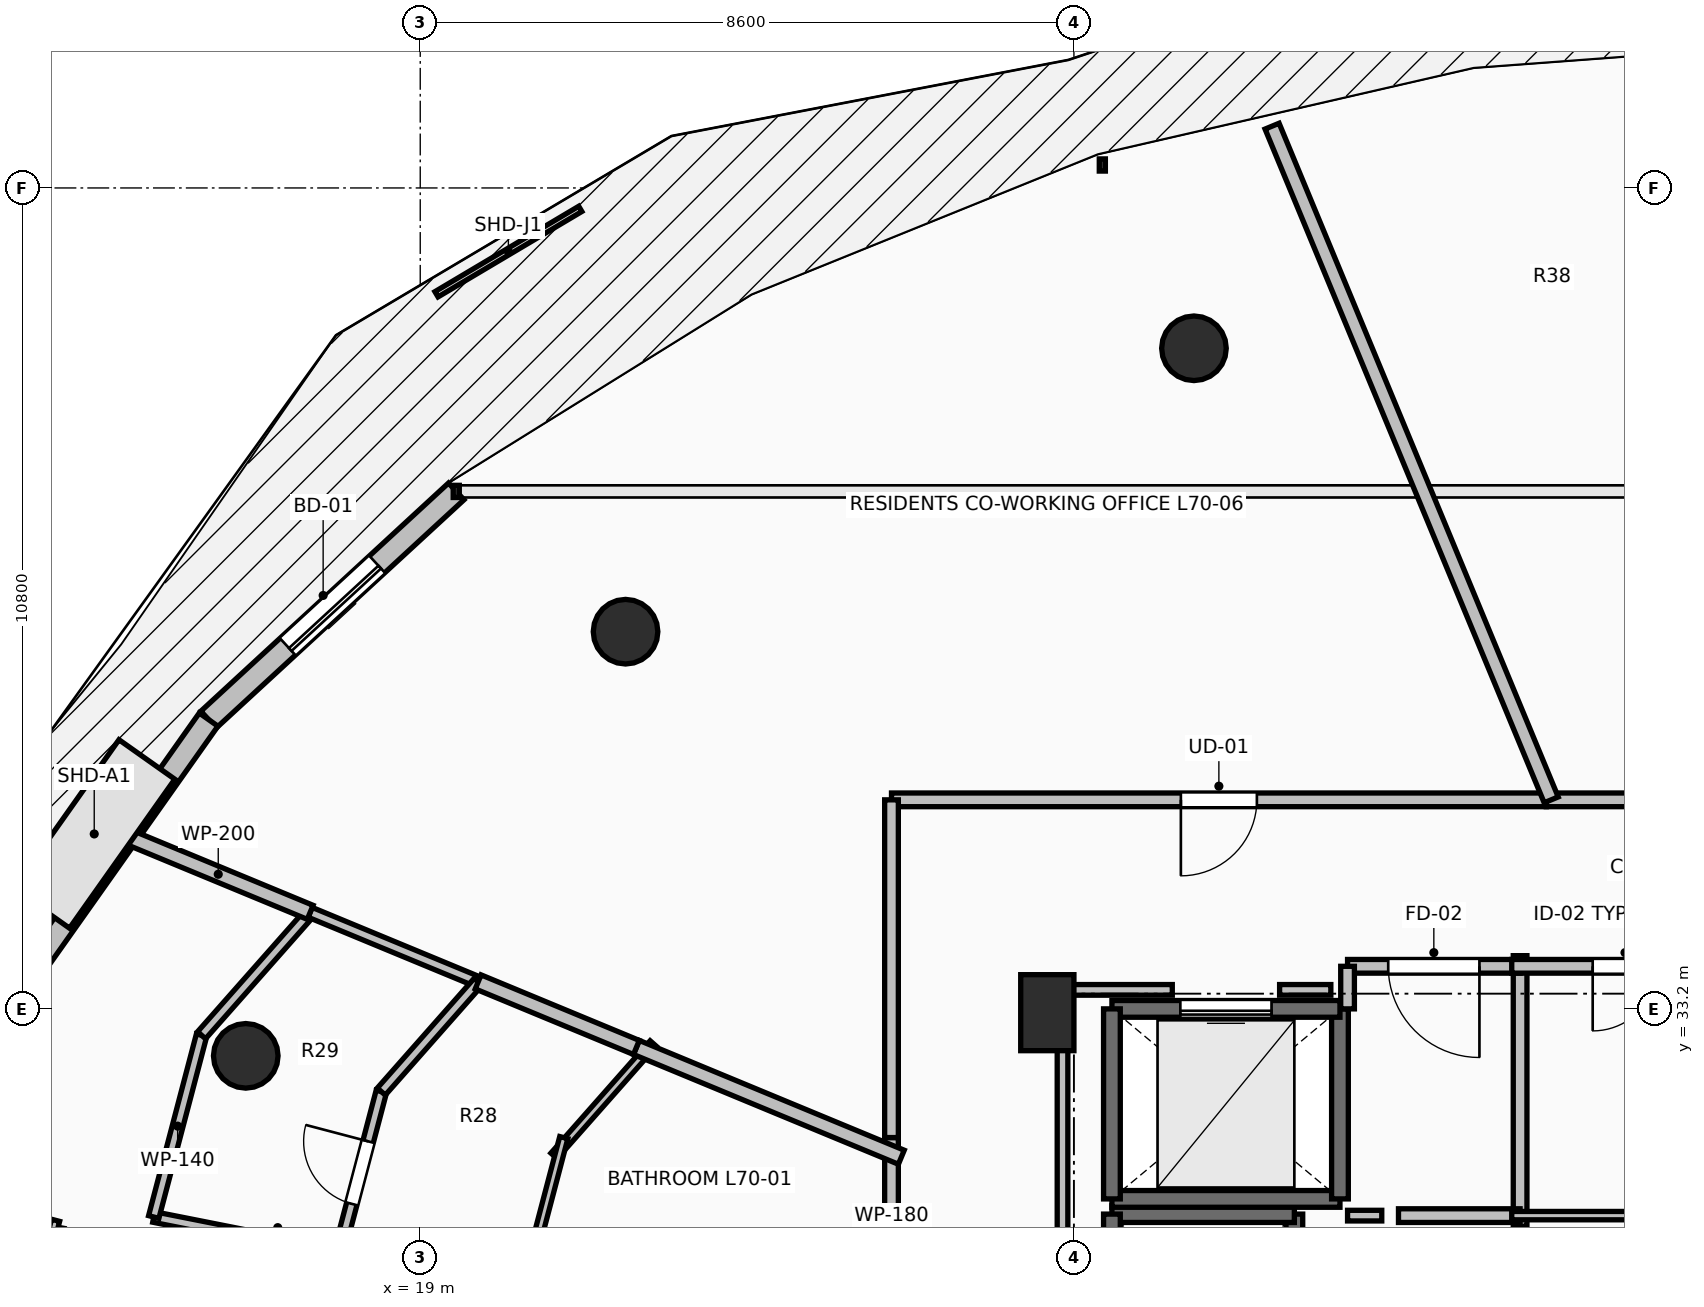
"""IFC4 building model, lengths in metres.
Left out: names, types, materials, properties, quantities, classifications, styles, units other than length and angle.
Written with IfcOpenShell. Run it as: python <this file> out.ifc"""

import sys

from ifc_helpers import new_model, si_unit, direction, frame, frame_2d, origin, origin_2d, place, context, subcontext, project, spatial, rectangle, circle, extrude, element, fill, save


model = new_model("IFC4")
c1 = context("Model", 3, precision=1e-05, world=origin(), true_north=direction((0.0, 1.0)))
c2 = subcontext(c1, "Body", "Model", "MODEL_VIEW")
j1 = project(units=[si_unit("LENGTHUNIT", "METRE"), si_unit("PLANEANGLEUNIT", "RADIAN")], contexts=[c1])
p1 = place(None, origin())
s1 = spatial("IfcSite", under=j1, at=p1, CompositionType="ELEMENT")
p2 = place(p1, origin())
s2 = spatial("IfcBuilding", under=s1, at=p2, CompositionType="ELEMENT")
p3 = place(p2, frame((0.0, 0.0, 259.1)))
s3 = spatial("IfcBuildingStorey", under=s2, at=p3, CompositionType="ELEMENT", Elevation=259.1)
for number, where, z_axis, x_axis in (
    (1, (29.179, 41.891, 0.0), (0.0, 0.0, 1.0), (-0.383, 0.924, 0.0)),
    (2, (21.701, 38.162, 0.0), (0.0, 0.0, 1.0), (-0.707, 0.707, 0.0)),
    (3, (16.705, 32.582, 0.0), (0.0, 0.0, 1.0), (-0.924, 0.383, 0.0)),
):
    element("IfcColumn", number, at=place(p3, frame(where, z_axis=z_axis, x_axis=x_axis)), inside=s3, PredefinedType="COLUMN", context=c2, shape_type="SweptSolid", body=[
        extrude(circle(Radius=0.425, at=origin_2d()), origin(), (0.0, 0.0, 1.0), 3.55),
    ])
p4 = place(p3, frame((27.25, 33.15, 0.0), z_axis=(0.0, 0.0, 1.0), x_axis=(1.0, 0.0, 0.0)))
e4 = element("IfcColumn", 4, at=p4, inside=s3, PredefinedType="PILASTER", context=c2, shape_type="SweptSolid", body=[
    extrude(rectangle(XDim=0.7, YDim=1.0, at=origin_2d()), origin(), (0.0, 0.0, 1.0), 3.55),
])
p5 = place(p3, frame((19.474, 40.008, 0.0), z_axis=(0.0, 0.0, 1.0), x_axis=(-0.735445373611, -0.677584018727, 0.0)))
e5 = element("IfcWall", 5, at=p5, inside=s3, PredefinedType="STANDARD", context=c2, shape_type="SweptSolid", body=[
    extrude(rectangle(XDim=4.43, YDim=0.3, at=frame_2d((2.215, 0.0))), origin(), (0.0, 0.0, 1.0), 3.29),
])
p6 = place(p5, frame((1.415, 0.0, 0.0)))
e6 = element("IfcOpeningElement", 6, at=p6, cuts=e5, PredefinedType="OPENING", context=c2, shape_type="SweptSolid", body=[
    extrude(rectangle(XDim=1.6, YDim=2.3, at=frame_2d((0.8, 1.15))), frame((0.0, 0.165, 0.0), z_axis=(0.0, -1.0, 0.0), x_axis=(1.0, 0.0, 0.0)), (0.0, 0.0, 1.0), 0.33),
])
p7 = place(p3, frame((16.216, 37.006, 0.0), z_axis=(0.0, 0.0, 1.0), x_axis=(-0.577261247247, -0.816559521668, 0.0)))
e7 = element("IfcWall", 7, at=p7, inside=s3, PredefinedType="STANDARD", context=c2, shape_type="SweptSolid", body=[
    extrude(rectangle(XDim=4.194, YDim=0.3, at=frame_2d((2.097, 0.0))), origin(), (0.0, 0.0, 1.0), 3.29),
])
p8 = place(p3, frame((30.5, 28.0, 0.0), z_axis=(0.0, 0.0, 1.0), x_axis=(0.0, 1.0, 0.0)))
e8 = element("IfcWall", 8, at=p8, inside=s3, PredefinedType="SHEAR", context=c2, shape_type="SweptSolid", body=[
    extrude(rectangle(XDim=2.5, YDim=0.22, at=frame_2d((1.25, 0.0))), origin(), (0.0, 0.0, 1.0), 3.29),
])
p9 = place(p3, frame((30.5, 30.5, 0.0), z_axis=(0.0, 0.0, 1.0), x_axis=(-1.0, 0.0, 0.0)))
e9 = element("IfcWall", 9, at=p9, inside=s3, PredefinedType="SHEAR", context=c2, shape_type="SweptSolid", body=[
    extrude(rectangle(XDim=2.4, YDim=0.22, at=frame_2d((1.2, 0.0))), origin(), (0.0, 0.0, 1.0), 3.29),
])
p10 = place(p3, frame((28.1, 30.5, 0.0), z_axis=(0.0, 0.0, 1.0), x_axis=(0.0, -1.0, 0.0)))
e10 = element("IfcWall", 10, at=p10, inside=s3, PredefinedType="SHEAR", context=c2, shape_type="SweptSolid", body=[
    extrude(rectangle(XDim=2.5, YDim=0.22, at=frame_2d((1.25, 0.0))), origin(), (0.0, 0.0, 1.0), 3.29),
])
p11 = place(p3, frame((28.1, 30.7, 0.0), z_axis=(0.0, 0.0, 1.0), x_axis=(1.0, 0.0, 0.0)))
e11 = element("IfcWall", 11, at=p11, inside=s3, PredefinedType="SOLIDWALL", context=c2, shape_type="SweptSolid", body=[
    extrude(rectangle(XDim=3.0, YDim=0.22, at=frame_2d((1.5, 0.0))), origin(), (0.0, 0.0, 1.0), 3.29),
])
p12 = place(p3, frame((31.1, 30.7, 0.0), z_axis=(0.0, 0.0, 1.0), x_axis=(0.0, 1.0, 0.0)))
e12 = element("IfcWall", 12, at=p12, inside=s3, PredefinedType="SOLIDWALL", context=c2, shape_type="SweptSolid", body=[
    extrude(rectangle(XDim=2.5, YDim=0.22, at=frame_2d((1.25, 0.0))), origin(), (0.0, 0.0, 1.0), 3.29),
])
p13 = place(p3, frame((31.1, 33.2, 0.0), z_axis=(0.0, 0.0, 1.0), x_axis=(-1.0, 0.0, 0.0)))
e13 = element("IfcWall", 13, at=p13, inside=s3, PredefinedType="SOLIDWALL", context=c2, shape_type="SweptSolid", body=[
    extrude(rectangle(XDim=3.0, YDim=0.22, at=frame_2d((1.5, 0.0))), origin(), (0.0, 0.0, 1.0), 3.29),
])
p14 = place(p13, frame((0.9, 0.0, 0.0)))
e14 = element("IfcOpeningElement", 14, at=p14, cuts=e13, PredefinedType="OPENING", context=c2, shape_type="SweptSolid", body=[
    extrude(rectangle(XDim=1.2, YDim=2.2, at=frame_2d((0.6, 1.1))), frame((0.0, 0.125, 0.0), z_axis=(0.0, -1.0, 0.0), x_axis=(1.0, 0.0, 0.0)), (0.0, 0.0, 1.0), 0.25),
])
p15 = place(p3, frame((28.1, 33.2, 0.0), z_axis=(0.0, 0.0, 1.0), x_axis=(0.0, -1.0, 0.0)))
e15 = element("IfcWall", 15, at=p15, inside=s3, PredefinedType="SOLIDWALL", context=c2, shape_type="SweptSolid", body=[
    extrude(rectangle(XDim=2.5, YDim=0.22, at=frame_2d((1.25, 0.0))), origin(), (0.0, 0.0, 1.0), 3.29),
])
p16 = place(p3, frame((33.47, 30.34, 0.0), z_axis=(0.0, 0.0, 1.0), x_axis=(0.0, 1.0, 0.0)))
e16 = element("IfcWall", 16, at=p16, inside=s3, PredefinedType="PARTITIONING", context=c2, shape_type="SweptSolid", body=[
    extrude(rectangle(XDim=3.56, YDim=0.18, at=frame_2d((1.78, 0.0))), origin(), (0.0, 0.0, 1.0), 3.29),
])
p17 = place(p3, frame((31.87, 30.48, 0.0), z_axis=(0.0, 0.0, 1.0), x_axis=(1.0, 0.0, 0.0)))
e17 = element("IfcWall", 17, at=p17, inside=s3, PredefinedType="PARTITIONING", context=c2, shape_type="SweptSolid", body=[
    extrude(rectangle(XDim=1.6, YDim=0.18, at=frame_2d((0.8, 0.0))), origin(), (0.0, 0.0, 1.0), 3.29),
])
p18 = place(p3, frame((33.47, 33.76, 0.0), z_axis=(0.0, 0.0, 1.0), x_axis=(-1.0, 0.0, 0.0)))
e18 = element("IfcWall", 18, at=p18, inside=s3, PredefinedType="PARTITIONING", context=c2, shape_type="SweptSolid", body=[
    extrude(rectangle(XDim=2.27, YDim=0.18, at=frame_2d((1.135, 0.0))), origin(), (0.0, 0.0, 1.0), 3.29),
])
p19 = place(p18, frame((0.535, 0.0, 0.0)))
e19 = element("IfcOpeningElement", 19, at=p19, cuts=e18, PredefinedType="OPENING", context=c2, shape_type="SweptSolid", body=[
    extrude(rectangle(XDim=1.2, YDim=2.15, at=frame_2d((0.6, 1.075))), frame((0.0, 0.105, 0.0), z_axis=(0.0, -1.0, 0.0), x_axis=(1.0, 0.0, 0.0)), (0.0, 0.0, 1.0), 0.21),
])
p20 = place(p3, frame((31.2, 33.76, 0.0), z_axis=(0.0, 0.0, 1.0), x_axis=(0.0, -1.0, 0.0)))
e20 = element("IfcWall", 20, at=p20, inside=s3, PredefinedType="PARTITIONING", context=c2, shape_type="SweptSolid", body=[
    extrude(rectangle(XDim=0.56, YDim=0.18, at=frame_2d((0.28, 0.0))), origin(), (0.0, 0.0, 1.0), 3.29),
])
p21 = place(p3, frame((33.36, 30.48, 0.0), z_axis=(0.0, 0.0, 1.0), x_axis=(1.0, 0.0, 0.0)))
e21 = element("IfcWall", 21, at=p21, inside=s3, PredefinedType="PARTITIONING", context=c2, shape_type="SweptSolid", body=[
    extrude(rectangle(XDim=1.81, YDim=0.11, at=frame_2d((0.905, 0.0))), origin(), (0.0, 0.0, 1.0), 3.29),
])
p22 = place(p3, frame((36.34, 33.76, 0.0), z_axis=(0.0, 0.0, 1.0), x_axis=(-1.0, 0.0, 0.0)))
e22 = element("IfcWall", 22, at=p22, inside=s3, PredefinedType="PARTITIONING", context=c2, shape_type="SweptSolid", body=[
    extrude(rectangle(XDim=2.98, YDim=0.18, at=frame_2d((1.49, 0.0))), origin(), (0.0, 0.0, 1.0), 3.29),
])
p23 = place(p22, frame((1.065, 0.0, 0.0)))
e23 = element("IfcOpeningElement", 23, at=p23, cuts=e22, PredefinedType="OPENING", context=c2, shape_type="SweptSolid", body=[
    extrude(rectangle(XDim=0.85, YDim=2.1, at=frame_2d((0.425, 1.05))), frame((0.0, 0.105, 0.0), z_axis=(0.0, -1.0, 0.0), x_axis=(1.0, 0.0, 0.0)), (0.0, 0.0, 1.0), 0.21),
])
p24 = place(p3, frame((25.2, 31.507, 0.0), z_axis=(0.0, 0.0, 1.0), x_axis=(0.0, -1.0, 0.0)))
e24 = element("IfcWall", 24, at=p24, inside=s3, PredefinedType="PARTITIONING", context=c2, shape_type="SweptSolid", body=[
    extrude(rectangle(XDim=3.048, YDim=0.18, at=frame_2d((1.524, 0.0))), origin(), (0.0, 0.0, 1.0), 2.482),
])
p25 = place(p3, frame((36.55, 35.95, 0.0), z_axis=(0.0, 0.0, 1.0), x_axis=(-1.0, 0.0, 0.0)))
e25 = element("IfcWall", 25, at=p25, inside=s3, PredefinedType="PARTITIONING", context=c2, shape_type="SweptSolid", body=[
    extrude(rectangle(XDim=2.736, YDim=0.18, at=frame_2d((1.368, 0.0))), origin(), (0.0, 0.0, 1.0), 3.29),
])
p26 = place(p3, frame((33.814, 35.95, 0.0), z_axis=(0.0, 0.0, 1.0), x_axis=(-1.0, 0.0, 0.0)))
e26 = element("IfcWall", 26, at=p26, inside=s3, PredefinedType="PARTITIONING", context=c2, shape_type="SweptSolid", body=[
    extrude(rectangle(XDim=8.614, YDim=0.18, at=frame_2d((4.307, 0.0))), origin(), (0.0, 0.0, 1.0), 2.482),
])
p27 = place(p26, frame((3.807, 0.0, 0.0)))
e27 = element("IfcOpeningElement", 27, at=p27, cuts=e26, PredefinedType="OPENING", context=c2, shape_type="SweptSolid", body=[
    extrude(rectangle(XDim=1.0, YDim=2.15, at=frame_2d((0.5, 1.075))), frame((0.0, 0.105, 0.0), z_axis=(0.0, -1.0, 0.0), x_axis=(1.0, 0.0, 0.0)), (0.0, 0.0, 1.0), 0.21),
])
p28 = place(p3, frame((25.2, 35.95, 0.0), z_axis=(0.0, 0.0, 1.0), x_axis=(0.0, -1.0, 0.0)))
e28 = element("IfcWall", 28, at=p28, inside=s3, PredefinedType="PARTITIONING", context=c2, shape_type="SweptSolid", body=[
    extrude(rectangle(XDim=4.443, YDim=0.18, at=frame_2d((2.221, 0.0))), origin(), (0.0, 0.0, 1.0), 2.482),
])
p29 = place(p3, frame((19.236, 29.72, 0.0), z_axis=(0.0, 0.0, 1.0), x_axis=(-0.980906665774, 0.194479081243, 0.0)))
e29 = element("IfcWall", 29, at=p29, inside=s3, PredefinedType="PARTITIONING", context=c2, shape_type="SweptSolid", body=[
    extrude(rectangle(XDim=3.815, YDim=0.14, at=frame_2d((1.907, 0.0))), origin(), (0.0, 0.0, 1.0), 2.874),
])
p30 = place(p29, frame((1.737, 0.0, 0.0)))
e30 = element("IfcOpeningElement", 30, at=p30, cuts=e29, PredefinedType="OPENING", context=c2, shape_type="SweptSolid", body=[
    extrude(rectangle(XDim=0.9, YDim=2.1, at=frame_2d((0.45, 1.05))), frame((0.0, 0.085, 0.0), z_axis=(0.0, -1.0, 0.0), x_axis=(1.0, 0.0, 0.0)), (0.0, 0.0, 1.0), 0.17),
])
p31 = place(p3, frame((15.494, 30.462, 0.0), z_axis=(0.0, 0.0, 1.0), x_axis=(0.254459276467, 0.967083489995, 0.0)))
e31 = element("IfcWall", 31, at=p31, inside=s3, PredefinedType="PARTITIONING", context=c2, shape_type="SweptSolid", body=[
    extrude(rectangle(XDim=2.472, YDim=0.14, at=frame_2d((1.236, 0.0))), origin(), (0.0, 0.0, 1.0), 3.29),
])
p32 = place(p3, frame((16.123, 32.853, 0.0), z_axis=(0.0, 0.0, 1.0), x_axis=(0.662205183315, 0.749322557508, 0.0)))
e32 = element("IfcWall", 32, at=p32, inside=s3, PredefinedType="PARTITIONING", context=c2, shape_type="SweptSolid", body=[
    extrude(rectangle(XDim=2.158, YDim=0.14, at=frame_2d((1.079, 0.0))), origin(), (0.0, 0.0, 1.0), 3.29),
])
p33 = place(p3, frame((17.552, 34.47, 0.0), z_axis=(0.0, 0.0, 1.0), x_axis=(0.923932252837, -0.382556129434, 0.0)))
e33 = element("IfcWall", 33, at=p33, inside=s3, PredefinedType="PARTITIONING", context=c2, shape_type="SweptSolid", body=[
    extrude(rectangle(XDim=2.392, YDim=0.14, at=frame_2d((1.196, 0.0))), origin(), (0.0, 0.0, 1.0), 2.874),
])
p34 = place(p3, frame((12.45, 30.592, 0.0), z_axis=(0.0, 0.0, 1.0), x_axis=(0.984212226867, -0.176992351488, 0.0)))
e34 = element("IfcWall", 34, at=p34, inside=s3, PredefinedType="PARTITIONING", context=c2, shape_type="SweptSolid", body=[
    extrude(rectangle(XDim=1.884, YDim=0.11, at=frame_2d((0.942, 0.0))), origin(), (0.0, 0.0, 1.0), 3.29),
])
p35 = place(p3, frame((14.203, 30.418, 0.0), z_axis=(0.0, 0.0, 1.0), x_axis=(-0.254460123068, -0.967083267236, 0.0)))
e35 = element("IfcWall", 35, at=p35, inside=s3, PredefinedType="PARTITIONING", context=c2, shape_type="SweptSolid", body=[
    extrude(rectangle(XDim=4.709, YDim=0.11, at=frame_2d((2.354, 0.0))), origin(), (0.0, 0.0, 1.0), 3.29),
])
p36 = place(p35, frame((1.904, 0.0, 0.0)))
e36 = element("IfcOpeningElement", 36, at=p36, cuts=e35, PredefinedType="OPENING", context=c2, shape_type="SweptSolid", body=[
    extrude(rectangle(XDim=0.9, YDim=2.1, at=frame_2d((0.45, 1.05))), frame((0.0, 0.07, 0.0), z_axis=(0.0, -1.0, 0.0), x_axis=(1.0, 0.0, 0.0)), (0.0, 0.0, 1.0), 0.14),
])
p37 = place(p3, frame((17.552, 34.47, 0.0), z_axis=(0.0, 0.0, 1.0), x_axis=(-0.9239134198, 0.382601610965, 0.0)))
e37 = element("IfcWall", 37, at=p37, inside=s3, PredefinedType="PARTITIONING", context=c2, shape_type="SweptSolid", body=[
    extrude(rectangle(XDim=2.618, YDim=0.2, at=frame_2d((1.309, 0.0))), origin(), (0.0, 0.0, 1.0), 3.29),
])
p38 = place(p3, frame((17.927, 29.98, 0.0), z_axis=(0.0, 0.0, 1.0), x_axis=(0.254476946675, 0.967078840432, 0.0)))
e38 = element("IfcWall", 38, at=p38, inside=s3, PredefinedType="PARTITIONING", context=c2, shape_type="SweptSolid", body=[
    extrude(rectangle(XDim=2.205, YDim=0.14, at=frame_2d((1.102, 0.0))), origin(), (0.0, 0.0, 1.0), 2.482),
])
p39 = place(p38, frame((0.677, 0.0, 0.0)))
e39 = element("IfcOpeningElement", 39, at=p39, cuts=e38, PredefinedType="OPENING", context=c2, shape_type="SweptSolid", body=[
    extrude(rectangle(XDim=0.85, YDim=2.1, at=frame_2d((0.425, 1.05))), frame((0.0, 0.085, 0.0), z_axis=(0.0, -1.0, 0.0), x_axis=(1.0, 0.0, 0.0)), (0.0, 0.0, 1.0), 0.17),
])
p40 = place(p3, frame((18.488, 32.112, 0.0), z_axis=(0.0, 0.0, 1.0), x_axis=(0.661856531983, 0.749630529709, 0.0)))
e40 = element("IfcWall", 40, at=p40, inside=s3, PredefinedType="PARTITIONING", context=c2, shape_type="SweptSolid", body=[
    extrude(rectangle(XDim=1.925, YDim=0.14, at=frame_2d((0.962, 0.0))), origin(), (0.0, 0.0, 1.0), 2.482),
])
p41 = place(p3, frame((22.066, 32.744, 0.0), z_axis=(0.0, 0.0, 1.0), x_axis=(-0.662047420969, -0.749461948593, 0.0)))
e41 = element("IfcWall", 41, at=p41, inside=s3, PredefinedType="PARTITIONING", context=c2, shape_type="SweptSolid", body=[
    extrude(rectangle(XDim=1.972, YDim=0.11, at=frame_2d((0.986, 0.0))), origin(), (0.0, 0.0, 1.0), 3.29),
])
p42 = place(p3, frame((20.889, 31.506, 0.0), z_axis=(0.0, 0.0, 1.0), x_axis=(-0.254406599134, -0.967097348935, 0.0)))
e42 = element("IfcWall", 42, at=p42, inside=s3, PredefinedType="PARTITIONING", context=c2, shape_type="SweptSolid", body=[
    extrude(rectangle(XDim=2.218, YDim=0.11, at=frame_2d((1.109, 0.0))), origin(), (0.0, 0.0, 1.0), 2.482),
])
p43 = place(p3, frame((25.329, 31.248, 0.0), z_axis=(0.0, 0.0, 1.0), x_axis=(-0.923827524065, 0.382808967736, 0.0)))
e43 = element("IfcWall", 43, at=p43, inside=s3, PredefinedType="PARTITIONING", context=c2, shape_type="SweptSolid", body=[
    extrude(rectangle(XDim=3.773, YDim=0.2, at=frame_2d((1.886, 0.0))), origin(), (0.0, 0.0, 1.0), 2.936),
])
p44 = place(p3, frame((21.844, 32.693, 0.0), z_axis=(0.0, 0.0, 1.0), x_axis=(-0.92387949598, 0.382683520559, 0.0)))
e44 = element("IfcWall", 44, at=p44, inside=s3, PredefinedType="PARTITIONING", context=c2, shape_type="SweptSolid", body=[
    extrude(rectangle(XDim=2.253, YDim=0.2, at=frame_2d((1.127, 0.0))), origin(), (0.0, 0.0, 1.0), 3.022),
])
p45 = place(p3, frame((30.207, 44.813, 0.0), z_axis=(0.0, 0.0, 1.0), x_axis=(0.38274436158, -0.92385429245, 0.0)))
e45 = element("IfcWall", 45, at=p45, inside=s3, PredefinedType="PARTITIONING", context=c2, shape_type="SweptSolid", body=[
    extrude(rectangle(XDim=9.594, YDim=0.2, at=frame_2d((4.797, 0.0))), origin(), (0.0, 0.0, 1.0), 2.482),
])
p46 = place(p3, frame((31.2, 30.48, 0.0), z_axis=(0.0, 0.0, 1.0), x_axis=(1.0, 0.0, 0.0)))
e46 = element("IfcWall", 46, at=p46, inside=s3, PredefinedType="PARTITIONING", context=c2, shape_type="SweptSolid", body=[
    extrude(rectangle(XDim=0.45, YDim=0.14, at=frame_2d((0.225, 0.0))), origin(), (0.0, 0.0, 1.0), 3.29),
])
p47 = place(p3, frame((30.98, 33.45, 0.0), z_axis=(0.0, 0.0, 1.0), x_axis=(-1.0, 0.0, 0.0)))
e47 = element("IfcWall", 47, at=p47, inside=s3, PredefinedType="PARTITIONING", context=c2, shape_type="SweptSolid", body=[
    extrude(rectangle(XDim=0.674, YDim=0.14, at=frame_2d((0.337, 0.0))), origin(), (0.0, 0.0, 1.0), 3.29),
])
p48 = place(p3, frame((28.894, 33.45, 0.0), z_axis=(0.0, 0.0, 1.0), x_axis=(-1.0, 0.0, 0.0)))
e48 = element("IfcWall", 48, at=p48, inside=s3, PredefinedType="PARTITIONING", context=c2, shape_type="SweptSolid", body=[
    extrude(rectangle(XDim=1.444, YDim=0.14, at=frame_2d((0.722, 0.0))), origin(), (0.0, 0.0, 1.0), 2.482),
])
p49 = place(p3, frame((27.45, 33.45, 0.0), z_axis=(0.0, 0.0, 1.0), x_axis=(0.0, -1.0, 0.0)))
e49 = element("IfcWall", 49, at=p49, inside=s3, PredefinedType="PARTITIONING", context=c2, shape_type="SweptSolid", body=[
    extrude(rectangle(XDim=5.254, YDim=0.14, at=frame_2d((2.627, 0.0))), origin(), (0.0, 0.0, 1.0), 2.482),
])
p50 = place(p6, origin())
e50 = element("IfcDoor", 50, at=p50, inside=s3, OperationType="SLIDING_TO_LEFT", PredefinedType="DOOR", context=c2, shape_type="SweptSolid", body=[
    extrude(rectangle(XDim=1.6, YDim=2.3, at=frame_2d((0.8, 1.15))), frame((0.0, 0.025, 0.0), z_axis=(0.0, -1.0, 0.0), x_axis=(1.0, 0.0, 0.0)), (0.0, 0.0, 1.0), 0.05),
])
fill(e6, e50)
p51 = place(p14, origin())
e51 = element("IfcDoor", 51, at=p51, inside=s3, OperationType="SLIDING_TO_LEFT", PredefinedType="DOOR", context=c2, shape_type="SweptSolid", body=[
    extrude(rectangle(XDim=1.2, YDim=2.2, at=frame_2d((0.6, 1.1))), frame((0.0, 0.025, 0.0), z_axis=(0.0, -1.0, 0.0), x_axis=(1.0, 0.0, 0.0)), (0.0, 0.0, 1.0), 0.05),
])
fill(e14, e51)
p52 = place(p19, origin())
e52 = element("IfcDoor", 52, at=p52, inside=s3, OperationType="SINGLE_SWING_LEFT", PredefinedType="DOOR", context=c2, shape_type="SweptSolid", body=[
    extrude(rectangle(XDim=1.2, YDim=2.15, at=frame_2d((0.6, 1.075))), frame((0.0, 0.025, 0.0), z_axis=(0.0, -1.0, 0.0), x_axis=(1.0, 0.0, 0.0)), (0.0, 0.0, 1.0), 0.05),
])
fill(e19, e52)
p53 = place(p23, origin())
e53 = element("IfcDoor", 53, at=p53, inside=s3, OperationType="SINGLE_SWING_RIGHT", PredefinedType="DOOR", context=c2, shape_type="SweptSolid", body=[
    extrude(rectangle(XDim=0.85, YDim=2.1, at=frame_2d((0.425, 1.05))), frame((0.0, 0.025, 0.0), z_axis=(0.0, -1.0, 0.0), x_axis=(1.0, 0.0, 0.0)), (0.0, 0.0, 1.0), 0.05),
])
fill(e23, e53)
p54 = place(p27, origin())
e54 = element("IfcDoor", 54, at=p54, inside=s3, OperationType="SINGLE_SWING_RIGHT", PredefinedType="DOOR", context=c2, shape_type="SweptSolid", body=[
    extrude(rectangle(XDim=1.0, YDim=2.15, at=frame_2d((0.5, 1.075))), frame((0.0, 0.025, 0.0), z_axis=(0.0, -1.0, 0.0), x_axis=(1.0, 0.0, 0.0)), (0.0, 0.0, 1.0), 0.05),
])
fill(e27, e54)
p55 = place(p39, origin())
e55 = element("IfcDoor", 55, at=p55, inside=s3, OperationType="SINGLE_SWING_RIGHT", PredefinedType="DOOR", context=c2, shape_type="SweptSolid", body=[
    extrude(rectangle(XDim=0.85, YDim=2.1, at=frame_2d((0.425, 1.05))), frame((0.0, 0.025, 0.0), z_axis=(0.0, -1.0, 0.0), x_axis=(1.0, 0.0, 0.0)), (0.0, 0.0, 1.0), 0.05),
])
fill(e39, e55)
save(model, sys.argv[1])
